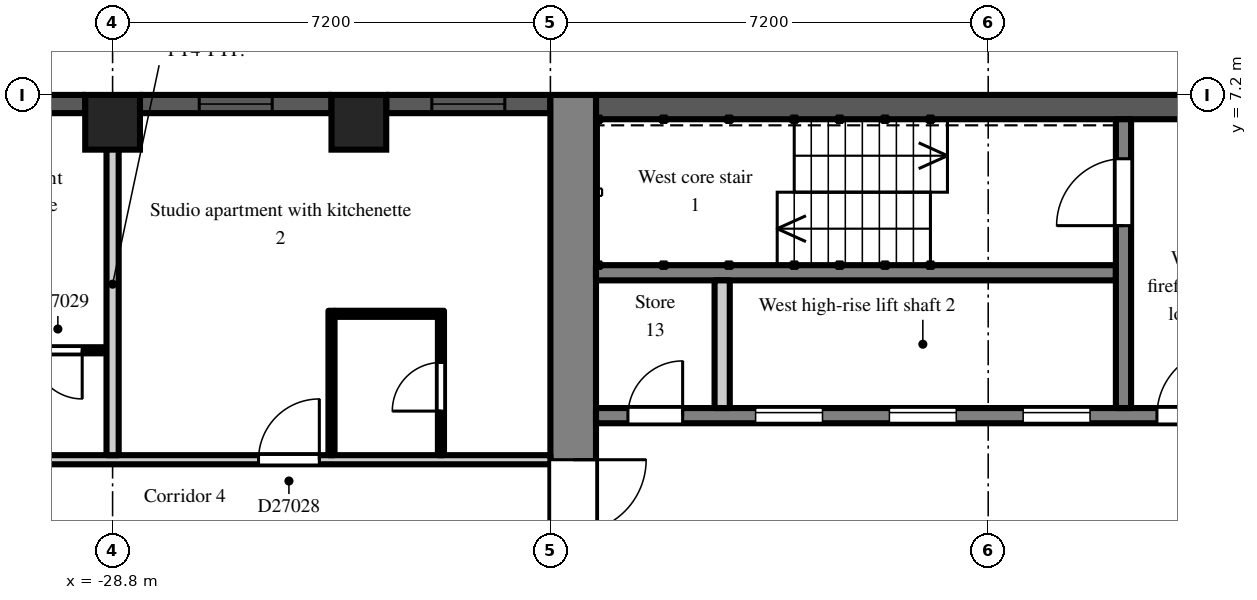
"""IFC4 building model, lengths in metres.
Left out: names, types, materials, properties, quantities, classifications, styles, units other than length and angle.
Written with IfcOpenShell. Run it as: python <this file> out.ifc"""

import sys

from ifc_helpers import new_model, si_unit, direction, frame, frame_2d, origin, origin_2d, place, context, subcontext, project, spatial, rectangle, extrude, element, fill, save


model = new_model("IFC4")
c1 = context("Model", 3, precision=1e-05, world=origin(), true_north=direction((0.0, 1.0)))
c2 = subcontext(c1, "Body", "Model", "MODEL_VIEW")
j1 = project(units=[si_unit("LENGTHUNIT", "METRE"), si_unit("PLANEANGLEUNIT", "RADIAN")], contexts=[c1])
p1 = place(None, origin())
s1 = spatial("IfcSite", under=j1, at=p1, CompositionType="ELEMENT")
p2 = place(p1, origin())
s2 = spatial("IfcBuilding", under=s1, at=p2, CompositionType="ELEMENT")
p3 = place(p2, frame((0.0, 0.0, 188.7)))
s3 = spatial("IfcBuildingStorey", under=s2, at=p3, CompositionType="ELEMENT", Elevation=188.7)
for number, where, z_axis, x_axis in (
    (1, (-28.8, 6.75, 0.0), (0.0, 0.0, 1.0), (1.0, 0.0, 0.0)),
    (2, (-24.75, 6.75, 0.0), (0.0, 0.0, 1.0), (1.0, 0.0, 0.0)),
):
    element("IfcColumn", number, at=place(p3, frame(where, z_axis=z_axis, x_axis=x_axis)), inside=s3, PredefinedType="COLUMN", context=c2, shape_type="SweptSolid", body=[
        extrude(rectangle(XDim=0.9, YDim=0.9, at=origin_2d()), origin(), (0.0, 0.0, 1.0), 3.0),
    ])
p4 = place(p3, frame((-21.6, 7.05, 0.0), z_axis=(0.0, 0.0, 1.0), x_axis=(-1.0, 0.0, 0.0)))
e3 = element("IfcWall", 3, at=p4, inside=s3, PredefinedType="SOLIDWALL", context=c2, shape_type="SweptSolid", body=[
    extrude(rectangle(XDim=2.7, YDim=0.3, at=frame_2d((1.35, 0.0))), origin(), (0.0, 0.0, 1.0), 2.2),
])
p5 = place(p4, frame((0.75, 0.0, 0.2)))
e4 = element("IfcOpeningElement", 4, at=p5, cuts=e3, PredefinedType="OPENING", context=c2, shape_type="SweptSolid", body=[
    extrude(rectangle(XDim=1.2, YDim=1.85, at=frame_2d((0.6, 0.925))), frame((0.0, 0.16, 0.0), z_axis=(0.0, -1.0, 0.0), x_axis=(1.0, 0.0, 0.0)), (0.0, 0.0, 1.0), 0.32),
])
p6 = place(p3, frame((-25.2, 7.05, 0.0), z_axis=(0.0, 0.0, 1.0), x_axis=(-1.0, 0.0, 0.0)))
e5 = element("IfcWall", 5, at=p6, inside=s3, PredefinedType="SOLIDWALL", context=c2, shape_type="SweptSolid", body=[
    extrude(rectangle(XDim=3.15, YDim=0.3, at=frame_2d((1.575, 0.0))), origin(), (0.0, 0.0, 1.0), 2.2),
])
p7 = place(p6, frame((0.975, 0.0, 0.2)))
e6 = element("IfcOpeningElement", 6, at=p7, cuts=e5, PredefinedType="OPENING", context=c2, shape_type="SweptSolid", body=[
    extrude(rectangle(XDim=1.2, YDim=1.85, at=frame_2d((0.6, 0.925))), frame((0.0, 0.16, 0.0), z_axis=(0.0, -1.0, 0.0), x_axis=(1.0, 0.0, 0.0)), (0.0, 0.0, 1.0), 0.32),
])
p8 = place(p3, frame((-29.25, 7.05, 0.0), z_axis=(0.0, 0.0, 1.0), x_axis=(-1.0, 0.0, 0.0)))
e7 = element("IfcWall", 7, at=p8, inside=s3, PredefinedType="SOLIDWALL", context=c2, shape_type="SweptSolid", body=[
    extrude(rectangle(XDim=6.3, YDim=0.3, at=frame_2d((3.15, 0.0))), origin(), (0.0, 0.0, 1.0), 2.2),
])
p9 = place(p8, frame((0.975, 0.0, 0.2)))
e8 = element("IfcOpeningElement", 8, at=p9, cuts=e7, PredefinedType="OPENING", context=c2, shape_type="SweptSolid", body=[
    extrude(rectangle(XDim=1.2, YDim=1.85, at=frame_2d((0.6, 0.925))), frame((0.0, 0.16, 0.0), z_axis=(0.0, -1.0, 0.0), x_axis=(1.0, 0.0, 0.0)), (0.0, 0.0, 1.0), 0.32),
])
p10 = place(p8, frame((4.125, 0.0, 0.2)))
e9 = element("IfcOpeningElement", 9, at=p10, cuts=e7, PredefinedType="OPENING", context=c2, shape_type="SweptSolid", body=[
    extrude(rectangle(XDim=1.2, YDim=1.85, at=frame_2d((0.6, 0.925))), frame((0.0, 0.16, 0.0), z_axis=(0.0, -1.0, 0.0), x_axis=(1.0, 0.0, 0.0)), (0.0, 0.0, 1.0), 0.32),
])
p11 = place(p3, frame((-21.225, -7.2, 0.0), z_axis=(0.0, 0.0, 1.0), x_axis=(0.0, 1.0, 0.0)))
e10 = element("IfcWall", 10, at=p11, inside=s3, PredefinedType="SHEAR", context=c2, shape_type="SweptSolid", body=[
    extrude(rectangle(XDim=14.4, YDim=0.75, at=frame_2d((7.2, 0.0))), origin(), (0.0, 0.0, 1.0), 2.6),
])
p12 = place(p11, frame((6.0, 0.0, 0.0)))
e11 = element("IfcOpeningElement", 11, at=p12, cuts=e10, PredefinedType="OPENING", context=c2, shape_type="SweptSolid", body=[
    extrude(rectangle(XDim=2.4, YDim=2.2, at=frame_2d((1.2, 1.1))), frame((0.0, 0.385, 0.0), z_axis=(0.0, -1.0, 0.0), x_axis=(1.0, 0.0, 0.0)), (0.0, 0.0, 1.0), 0.77),
])
p13 = place(p3, frame((-7.9, 7.0, 0.0), z_axis=(0.0, 0.0, 1.0), x_axis=(-1.0, 0.0, 0.0)))
e12 = element("IfcWall", 12, at=p13, inside=s3, PredefinedType="SHEAR", context=c2, shape_type="SweptSolid", body=[
    extrude(rectangle(XDim=12.95, YDim=0.4, at=frame_2d((6.475, 0.0))), origin(), (0.0, 0.0, 1.0), 2.6),
])
p14 = place(p3, frame((-7.9, 1.925, 0.0), z_axis=(0.0, 0.0, 1.0), x_axis=(-1.0, 0.0, 0.0)))
e13 = element("IfcWall", 13, at=p14, inside=s3, PredefinedType="SHEAR", context=c2, shape_type="SweptSolid", body=[
    extrude(rectangle(XDim=12.95, YDim=0.25, at=frame_2d((6.475, 0.0))), origin(), (0.0, 0.0, 1.0), 2.6),
])
p15 = place(p14, frame((4.825, 0.0, 0.0)))
e14 = element("IfcOpeningElement", 14, at=p15, cuts=e13, PredefinedType="OPENING", context=c2, shape_type="SweptSolid", body=[
    extrude(rectangle(XDim=1.1, YDim=2.1, at=frame_2d((0.55, 1.05))), frame((0.0, 0.135, 0.0), z_axis=(0.0, -1.0, 0.0), x_axis=(1.0, 0.0, 0.0)), (0.0, 0.0, 1.0), 0.27),
])
p16 = place(p14, frame((7.025, 0.0, 0.0)))
e15 = element("IfcOpeningElement", 15, at=p16, cuts=e13, PredefinedType="OPENING", context=c2, shape_type="SweptSolid", body=[
    extrude(rectangle(XDim=1.1, YDim=2.1, at=frame_2d((0.55, 1.05))), frame((0.0, 0.135, 0.0), z_axis=(0.0, -1.0, 0.0), x_axis=(1.0, 0.0, 0.0)), (0.0, 0.0, 1.0), 0.27),
])
p17 = place(p14, frame((9.225, 0.0, 0.0)))
e16 = element("IfcOpeningElement", 16, at=p17, cuts=e13, PredefinedType="OPENING", context=c2, shape_type="SweptSolid", body=[
    extrude(rectangle(XDim=1.1, YDim=2.1, at=frame_2d((0.55, 1.05))), frame((0.0, 0.135, 0.0), z_axis=(0.0, -1.0, 0.0), x_axis=(1.0, 0.0, 0.0)), (0.0, 0.0, 1.0), 0.27),
])
p18 = place(p14, frame((0.525, 0.0, 0.0)))
e17 = element("IfcOpeningElement", 17, at=p18, cuts=e13, PredefinedType="OPENING", context=c2, shape_type="SweptSolid", body=[
    extrude(rectangle(XDim=0.9, YDim=2.1, at=frame_2d((0.45, 1.05))), frame((0.0, 0.135, 0.0), z_axis=(0.0, -1.0, 0.0), x_axis=(1.0, 0.0, 0.0)), (0.0, 0.0, 1.0), 0.27),
])
p19 = place(p14, frame((2.625, 0.0, 0.0)))
e18 = element("IfcOpeningElement", 18, at=p19, cuts=e13, PredefinedType="OPENING", context=c2, shape_type="SweptSolid", body=[
    extrude(rectangle(XDim=1.1, YDim=2.1, at=frame_2d((0.55, 1.05))), frame((0.0, 0.135, 0.0), z_axis=(0.0, -1.0, 0.0), x_axis=(1.0, 0.0, 0.0)), (0.0, 0.0, 1.0), 0.27),
])
p20 = place(p14, frame((11.525, 0.0, 0.0)))
e19 = element("IfcOpeningElement", 19, at=p20, cuts=e13, PredefinedType="OPENING", context=c2, shape_type="SweptSolid", body=[
    extrude(rectangle(XDim=0.9, YDim=2.1, at=frame_2d((0.45, 1.05))), frame((0.0, 0.135, 0.0), z_axis=(0.0, -1.0, 0.0), x_axis=(1.0, 0.0, 0.0)), (0.0, 0.0, 1.0), 0.27),
])
p21 = place(p3, frame((-12.3, 4.275, 0.0), z_axis=(0.0, 0.0, 1.0), x_axis=(-1.0, 0.0, 0.0)))
e20 = element("IfcWall", 20, at=p21, inside=s3, PredefinedType="SHEAR", context=c2, shape_type="SweptSolid", body=[
    extrude(rectangle(XDim=8.55, YDim=0.25, at=frame_2d((4.275, 0.0))), origin(), (0.0, 0.0, 1.0), 2.6),
])
p22 = place(p3, frame((-12.175, 2.05, 0.0), z_axis=(0.0, 0.0, 1.0), x_axis=(0.0, 1.0, 0.0)))
e21 = element("IfcWall", 21, at=p22, inside=s3, PredefinedType="SHEAR", context=c2, shape_type="SweptSolid", body=[
    extrude(rectangle(XDim=4.75, YDim=0.25, at=frame_2d((2.375, 0.0))), origin(), (0.0, 0.0, 1.0), 2.6),
])
p23 = place(p22, frame((3.0, 0.0, 0.0)))
e22 = element("IfcOpeningElement", 22, at=p23, cuts=e21, PredefinedType="OPENING", context=c2, shape_type="SweptSolid", body=[
    extrude(rectangle(XDim=1.1, YDim=2.1, at=frame_2d((0.55, 1.05))), frame((0.0, 0.135, 0.0), z_axis=(0.0, -1.0, 0.0), x_axis=(1.0, 0.0, 0.0)), (0.0, 0.0, 1.0), 0.27),
])
p24 = place(p3, frame((-18.775, 2.05, 0.0), z_axis=(0.0, 0.0, 1.0), x_axis=(0.0, 1.0, 0.0)))
e23 = element("IfcWall", 23, at=p24, inside=s3, PredefinedType="PARTITIONING", context=c2, shape_type="SweptSolid", body=[
    extrude(rectangle(XDim=2.1, YDim=0.25, at=frame_2d((1.05, 0.0))), origin(), (0.0, 0.0, 1.0), 2.6),
])
p25 = place(p3, frame((-36.5, 1.2, 0.0), z_axis=(0.0, 0.0, 1.0), x_axis=(1.0, 0.0, 0.0)))
e24 = element("IfcWall", 24, at=p25, inside=s3, PredefinedType="PARTITIONING", context=c2, shape_type="SweptSolid", body=[
    extrude(rectangle(XDim=14.9, YDim=0.15, at=frame_2d((7.45, 0.0))), origin(), (0.0, 0.0, 1.0), 2.6),
])
p26 = place(p25, frame((10.1, 0.0, 0.0)))
e25 = element("IfcOpeningElement", 25, at=p26, cuts=e24, PredefinedType="OPENING", context=c2, shape_type="SweptSolid", body=[
    extrude(rectangle(XDim=1.0, YDim=2.1, at=frame_2d((0.5, 1.05))), frame((0.0, 0.085, 0.0), z_axis=(0.0, -1.0, 0.0), x_axis=(1.0, 0.0, 0.0)), (0.0, 0.0, 1.0), 0.17),
])
p27 = place(p25, frame((4.7, 0.0, 0.0)))
e26 = element("IfcOpeningElement", 26, at=p27, cuts=e24, PredefinedType="OPENING", context=c2, shape_type="SweptSolid", body=[
    extrude(rectangle(XDim=1.0, YDim=2.1, at=frame_2d((0.5, 1.05))), frame((0.0, 0.085, 0.0), z_axis=(0.0, -1.0, 0.0), x_axis=(1.0, 0.0, 0.0)), (0.0, 0.0, 1.0), 0.17),
])
p28 = place(p25, frame((1.15, 0.0, 0.0)))
e27 = element("IfcOpeningElement", 27, at=p28, cuts=e24, PredefinedType="OPENING", context=c2, shape_type="SweptSolid", body=[
    extrude(rectangle(XDim=1.8, YDim=2.1, at=frame_2d((0.9, 1.05))), frame((0.0, 0.085, 0.0), z_axis=(0.0, -1.0, 0.0), x_axis=(1.0, 0.0, 0.0)), (0.0, 0.0, 1.0), 0.17),
])
p29 = place(p3, frame((-30.55, 3.0, 0.0), z_axis=(0.0, 0.0, 1.0), x_axis=(1.0, 0.0, 0.0)))
e28 = element("IfcWall", 28, at=p29, inside=s3, PredefinedType="PARTITIONING", context=c2, shape_type="SweptSolid", body=[
    extrude(rectangle(XDim=1.65, YDim=0.1, at=frame_2d((0.825, 0.0))), origin(), (0.0, 0.0, 1.0), 2.6),
])
p30 = place(p29, frame((0.45, 0.0, 0.0)))
e29 = element("IfcOpeningElement", 29, at=p30, cuts=e28, PredefinedType="OPENING", context=c2, shape_type="SweptSolid", body=[
    extrude(rectangle(XDim=0.8, YDim=2.1, at=frame_2d((0.4, 1.05))), frame((0.0, 0.06, 0.0), z_axis=(0.0, -1.0, 0.0), x_axis=(1.0, 0.0, 0.0)), (0.0, 0.0, 1.0), 0.12),
])
p31 = place(p3, frame((-28.8, 1.275, 0.0), z_axis=(0.0, 0.0, 1.0), x_axis=(0.0, 1.0, 0.0)))
e30 = element("IfcWall", 30, at=p31, inside=s3, PredefinedType="PARTITIONING", context=c2, shape_type="SweptSolid", body=[
    extrude(rectangle(XDim=5.625, YDim=0.2, at=frame_2d((2.812, 0.0))), origin(), (0.0, 0.0, 1.0), 2.6),
])
p32 = place(p3, frame((-25.2, 1.275, 0.0), z_axis=(0.0, 0.0, 1.0), x_axis=(0.0, 1.0, 0.0)))
e31 = element("IfcWall", 31, at=p32, inside=s3, PredefinedType="PARTITIONING", context=c2, shape_type="SweptSolid", body=[
    extrude(rectangle(XDim=2.375, YDim=0.1, at=frame_2d((1.188, 0.0))), origin(), (0.0, 0.0, 1.0), 2.6),
])
p33 = place(p3, frame((-25.15, 3.6, 0.0), z_axis=(0.0, 0.0, 1.0), x_axis=(1.0, 0.0, 0.0)))
e32 = element("IfcWall", 32, at=p33, inside=s3, PredefinedType="PARTITIONING", context=c2, shape_type="SweptSolid", body=[
    extrude(rectangle(XDim=1.8, YDim=0.1, at=frame_2d((0.9, 0.0))), origin(), (0.0, 0.0, 1.0), 2.6),
])
p34 = place(p3, frame((-23.4, 1.275, 0.0), z_axis=(0.0, 0.0, 1.0), x_axis=(0.0, 1.0, 0.0)))
e33 = element("IfcWall", 33, at=p34, inside=s3, PredefinedType="PARTITIONING", context=c2, shape_type="SweptSolid", body=[
    extrude(rectangle(XDim=2.275, YDim=0.1, at=frame_2d((1.138, 0.0))), origin(), (0.0, 0.0, 1.0), 2.6),
])
p35 = place(p34, frame((0.725, 0.0, 0.0)))
e34 = element("IfcOpeningElement", 34, at=p35, cuts=e33, PredefinedType="OPENING", context=c2, shape_type="SweptSolid", body=[
    extrude(rectangle(XDim=0.8, YDim=2.1, at=frame_2d((0.4, 1.05))), frame((0.0, 0.06, 0.0), z_axis=(0.0, -1.0, 0.0), x_axis=(1.0, 0.0, 0.0)), (0.0, 0.0, 1.0), 0.12),
])
p36 = place(p5, origin())
e35 = element("IfcWindow", 35, at=p36, inside=s3, PartitioningType="SINGLE_PANEL", PredefinedType="WINDOW", context=c2, shape_type="SweptSolid", body=[
    extrude(rectangle(XDim=1.2, YDim=1.85, at=frame_2d((0.6, 0.925))), frame((0.0, 0.03, 0.0), z_axis=(0.0, -1.0, 0.0), x_axis=(1.0, 0.0, 0.0)), (0.0, 0.0, 1.0), 0.06),
])
fill(e4, e35)
p37 = place(p7, origin())
e36 = element("IfcWindow", 36, at=p37, inside=s3, PartitioningType="SINGLE_PANEL", PredefinedType="WINDOW", context=c2, shape_type="SweptSolid", body=[
    extrude(rectangle(XDim=1.2, YDim=1.85, at=frame_2d((0.6, 0.925))), frame((0.0, 0.03, 0.0), z_axis=(0.0, -1.0, 0.0), x_axis=(1.0, 0.0, 0.0)), (0.0, 0.0, 1.0), 0.06),
])
fill(e6, e36)
p38 = place(p15, origin())
e37 = element("IfcDoor", 37, at=p38, inside=s3, OperationType="SLIDING_TO_LEFT", PredefinedType="DOOR", context=c2, shape_type="SweptSolid", body=[
    extrude(rectangle(XDim=1.1, YDim=2.1, at=frame_2d((0.55, 1.05))), frame((0.0, 0.025, 0.0), z_axis=(0.0, -1.0, 0.0), x_axis=(1.0, 0.0, 0.0)), (0.0, 0.0, 1.0), 0.05),
])
fill(e14, e37)
p39 = place(p16, origin())
e38 = element("IfcDoor", 38, at=p39, inside=s3, OperationType="SLIDING_TO_LEFT", PredefinedType="DOOR", context=c2, shape_type="SweptSolid", body=[
    extrude(rectangle(XDim=1.1, YDim=2.1, at=frame_2d((0.55, 1.05))), frame((0.0, 0.025, 0.0), z_axis=(0.0, -1.0, 0.0), x_axis=(1.0, 0.0, 0.0)), (0.0, 0.0, 1.0), 0.05),
])
fill(e15, e38)
p40 = place(p17, origin())
e39 = element("IfcDoor", 39, at=p40, inside=s3, OperationType="SLIDING_TO_LEFT", PredefinedType="DOOR", context=c2, shape_type="SweptSolid", body=[
    extrude(rectangle(XDim=1.1, YDim=2.1, at=frame_2d((0.55, 1.05))), frame((0.0, 0.025, 0.0), z_axis=(0.0, -1.0, 0.0), x_axis=(1.0, 0.0, 0.0)), (0.0, 0.0, 1.0), 0.05),
])
fill(e16, e39)
p41 = place(p23, origin())
e40 = element("IfcDoor", 40, at=p41, inside=s3, OperationType="SINGLE_SWING_LEFT", PredefinedType="DOOR", context=c2, shape_type="SweptSolid", body=[
    extrude(rectangle(XDim=1.1, YDim=2.1, at=frame_2d((0.55, 1.05))), frame((0.0, 0.025, 0.0), z_axis=(0.0, -1.0, 0.0), x_axis=(1.0, 0.0, 0.0)), (0.0, 0.0, 1.0), 0.05),
])
fill(e22, e40)
p42 = place(p19, frame((1.1, 0.0, 0.0), z_axis=(0.0, 0.0, 1.0), x_axis=(-1.0, 0.0, 0.0)))
e41 = element("IfcDoor", 41, at=p42, inside=s3, OperationType="SINGLE_SWING_RIGHT", PredefinedType="DOOR", context=c2, shape_type="SweptSolid", body=[
    extrude(rectangle(XDim=1.1, YDim=2.1, at=frame_2d((0.55, 1.05))), frame((0.0, 0.025, 0.0), z_axis=(0.0, -1.0, 0.0), x_axis=(1.0, 0.0, 0.0)), (0.0, 0.0, 1.0), 0.05),
])
fill(e18, e41)
p43 = place(p12, frame((2.4, 0.0, 0.0), z_axis=(0.0, 0.0, 1.0), x_axis=(-1.0, 0.0, 0.0)))
e42 = element("IfcDoor", 42, at=p43, inside=s3, OperationType="DOUBLE_DOOR_DOUBLE_SWING", PredefinedType="DOOR", context=c2, shape_type="SweptSolid", body=[
    extrude(rectangle(XDim=2.4, YDim=2.2, at=frame_2d((1.2, 1.1))), frame((0.0, 0.025, 0.0), z_axis=(0.0, -1.0, 0.0), x_axis=(1.0, 0.0, 0.0)), (0.0, 0.0, 1.0), 0.05),
])
fill(e11, e42)
p44 = place(p20, frame((0.9, 0.0, 0.0), z_axis=(0.0, 0.0, 1.0), x_axis=(-1.0, 0.0, 0.0)))
e43 = element("IfcDoor", 43, at=p44, inside=s3, OperationType="SINGLE_SWING_RIGHT", PredefinedType="DOOR", context=c2, shape_type="SweptSolid", body=[
    extrude(rectangle(XDim=0.9, YDim=2.1, at=frame_2d((0.45, 1.05))), frame((0.0, 0.025, 0.0), z_axis=(0.0, -1.0, 0.0), x_axis=(1.0, 0.0, 0.0)), (0.0, 0.0, 1.0), 0.05),
])
fill(e19, e43)
p45 = place(p35, origin())
e44 = element("IfcDoor", 44, at=p45, inside=s3, OperationType="SINGLE_SWING_LEFT", PredefinedType="DOOR", context=c2, shape_type="SweptSolid", body=[
    extrude(rectangle(XDim=0.8, YDim=2.1, at=frame_2d((0.4, 1.05))), frame((0.0, 0.025, 0.0), z_axis=(0.0, -1.0, 0.0), x_axis=(1.0, 0.0, 0.0)), (0.0, 0.0, 1.0), 0.05),
])
fill(e34, e44)
p46 = place(p26, origin())
e45 = element("IfcDoor", 45, at=p46, inside=s3, OperationType="SINGLE_SWING_RIGHT", PredefinedType="DOOR", context=c2, shape_type="SweptSolid", body=[
    extrude(rectangle(XDim=1.0, YDim=2.1, at=frame_2d((0.5, 1.05))), frame((0.0, 0.025, 0.0), z_axis=(0.0, -1.0, 0.0), x_axis=(1.0, 0.0, 0.0)), (0.0, 0.0, 1.0), 0.05),
])
fill(e25, e45)
p47 = place(p30, frame((0.8, 0.0, 0.0), z_axis=(0.0, 0.0, 1.0), x_axis=(-1.0, 0.0, 0.0)))
e46 = element("IfcDoor", 46, at=p47, inside=s3, OperationType="SINGLE_SWING_LEFT", PredefinedType="DOOR", context=c2, shape_type="SweptSolid", body=[
    extrude(rectangle(XDim=0.8, YDim=2.1, at=frame_2d((0.4, 1.05))), frame((0.0, 0.025, 0.0), z_axis=(0.0, -1.0, 0.0), x_axis=(1.0, 0.0, 0.0)), (0.0, 0.0, 1.0), 0.05),
])
fill(e29, e46)
save(model, sys.argv[1])
